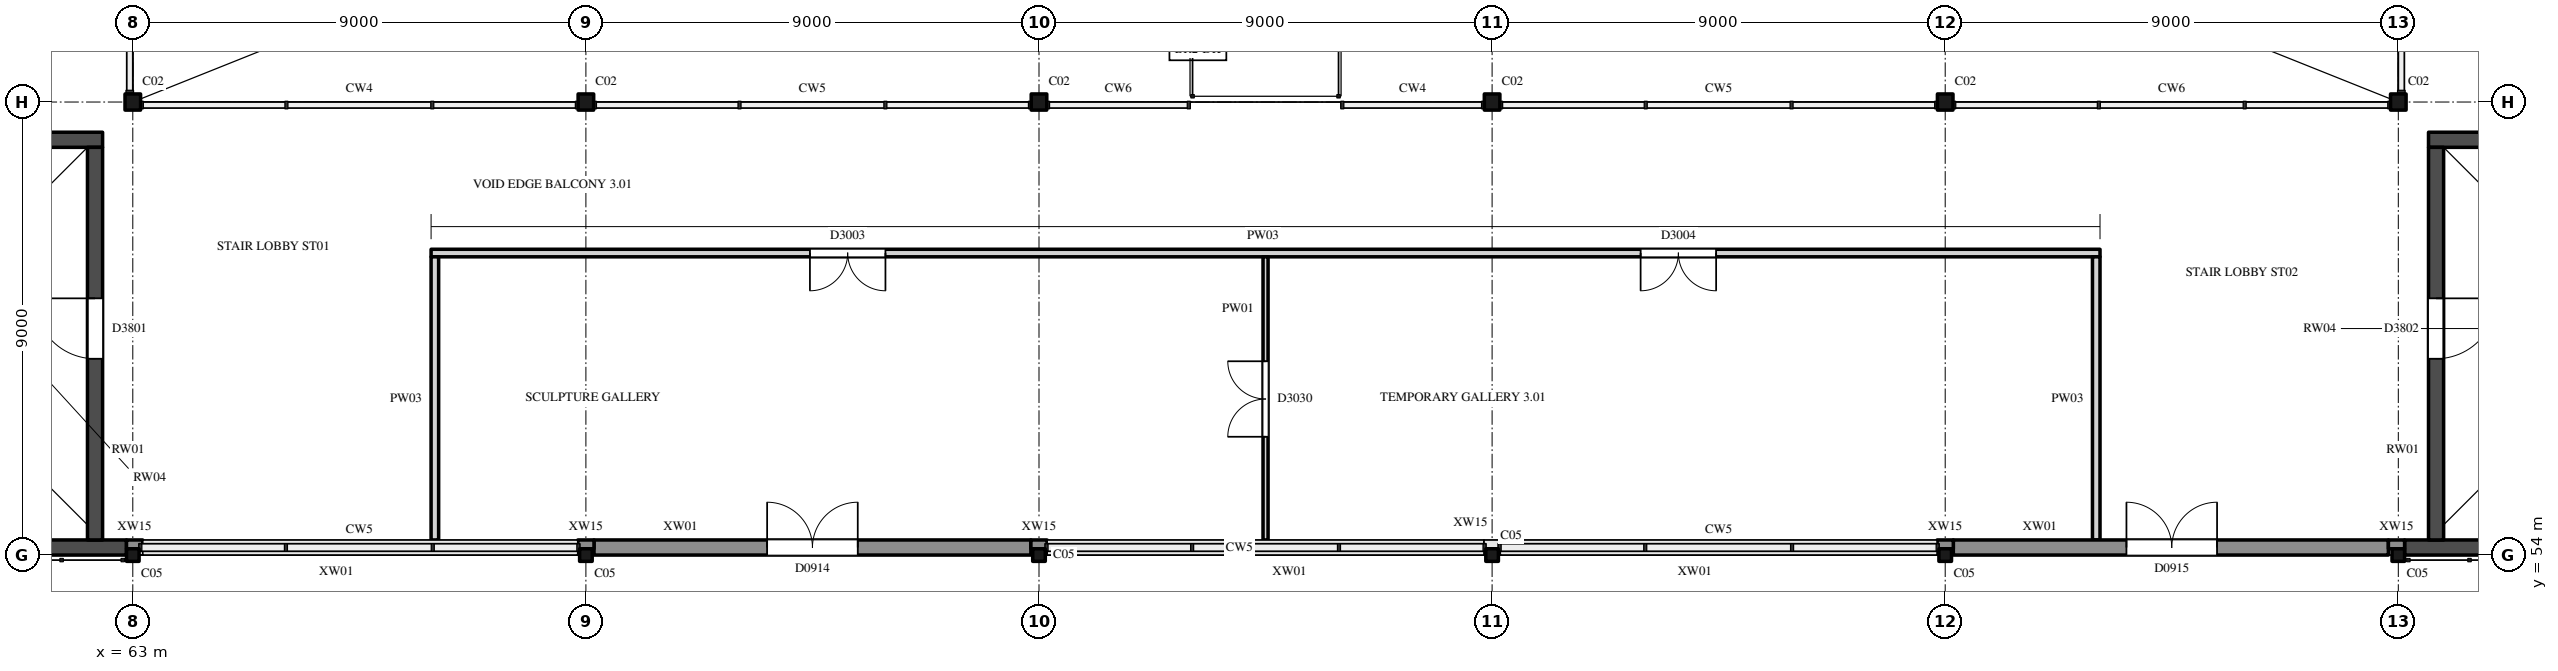
"""IFC4 building model, lengths in metres.
Left out: names, types, materials, properties, quantities, classifications, styles, units other than length and angle.
Written with IfcOpenShell. Run it as: python <this file> out.ifc"""

import sys

from ifc_helpers import new_model, si_unit, direction, frame, frame_2d, origin, origin_2d, place, context, subcontext, project, spatial, rectangle, hollow_rectangle, i_section, extrude, element, fill, save


model = new_model("IFC4")
c1 = context("Model", 3, precision=1e-05, world=origin(), true_north=direction((0.0, 1.0)))
c2 = subcontext(c1, "Body", "Model", "MODEL_VIEW")
j1 = project(units=[si_unit("LENGTHUNIT", "METRE"), si_unit("PLANEANGLEUNIT", "RADIAN")], contexts=[c1])
p1 = place(None, origin())
s1 = spatial("IfcSite", under=j1, at=p1, CompositionType="ELEMENT")
p2 = place(p1, origin())
s2 = spatial("IfcBuilding", under=s1, at=p2, CompositionType="ELEMENT")
p3 = place(p2, frame((0.0, 0.0, 16.0)))
s3 = spatial("IfcBuildingStorey", under=s2, at=p3, CompositionType="ELEMENT", Elevation=16.0)
for number, where, z_axis, x_axis in (
    (1, (63.0, 54.0, 0.0), (0.0, 0.0, 1.0), (1.0, 0.0, 0.0)),
    (2, (72.0, 54.0, 0.0), (0.0, 0.0, 1.0), (1.0, 0.0, 0.0)),
    (3, (81.0, 54.0, 0.0), (0.0, 0.0, 1.0), (1.0, 0.0, 0.0)),
    (4, (90.0, 54.0, 0.0), (0.0, 0.0, 1.0), (1.0, 0.0, 0.0)),
    (5, (99.0, 54.0, 0.0), (0.0, 0.0, 1.0), (1.0, 0.0, 0.0)),
    (6, (108.0, 54.0, 0.0), (0.0, 0.0, 1.0), (1.0, 0.0, 0.0)),
):
    element("IfcColumn", number, at=place(p3, frame(where, z_axis=z_axis, x_axis=x_axis)), inside=s3, PredefinedType="COLUMN", context=c2, shape_type="SweptSolid", body=[
        extrude(hollow_rectangle(XDim=0.25, YDim=0.25, WallThickness=0.012, InnerFilletRadius=0.019, OuterFilletRadius=0.031, at=origin_2d()), origin(), (0.0, 0.0, 1.0), 10.0),
    ])
for number, where, z_axis, x_axis in (
    (7, (63.0, 63.0, 0.0), (0.0, 0.0, 1.0), (1.0, 0.0, 0.0)),
    (8, (72.0, 63.0, 0.0), (0.0, 0.0, 1.0), (1.0, 0.0, 0.0)),
    (9, (81.0, 63.0, 0.0), (0.0, 0.0, 1.0), (1.0, 0.0, 0.0)),
    (10, (90.0, 63.0, 0.0), (0.0, 0.0, 1.0), (1.0, 0.0, 0.0)),
    (11, (99.0, 63.0, 0.0), (0.0, 0.0, 1.0), (1.0, 0.0, 0.0)),
    (12, (108.0, 63.0, 0.0), (0.0, 0.0, 1.0), (1.0, 0.0, 0.0)),
):
    element("IfcColumn", number, at=place(p3, frame(where, z_axis=z_axis, x_axis=x_axis)), inside=s3, PredefinedType="COLUMN", context=c2, shape_type="SweptSolid", body=[
        extrude(i_section(OverallWidth=0.309, OverallDepth=0.321, WebThickness=0.014, FlangeThickness=0.022, FilletRadius=0.017, at=origin_2d()), origin(), (0.0, 0.0, 1.0), 10.0),
    ])
p4 = place(p3, frame((54.3, 54.15, 0.0), z_axis=(0.0, 0.0, 1.0), x_axis=(1.0, 0.0, 0.0)))
e13 = element("IfcWall", 13, at=p4, inside=s3, PredefinedType="SHEAR", context=c2, shape_type="SweptSolid", body=[
    extrude(rectangle(XDim=8.575, YDim=0.3, at=frame_2d((4.288, 0.0))), origin(), (0.0, 0.0, 1.0), 10.0),
])
p5 = place(p3, frame((54.3, 62.25, 0.0), z_axis=(0.0, 0.0, 1.0), x_axis=(1.0, 0.0, 0.0)))
e14 = element("IfcWall", 14, at=p5, inside=s3, PredefinedType="SHEAR", context=c2, shape_type="SweptSolid", body=[
    extrude(rectangle(XDim=8.1, YDim=0.3, at=frame_2d((4.05, 0.0))), origin(), (0.0, 0.0, 1.0), 10.0),
])
p6 = place(p3, frame((62.25, 54.3, 0.0), z_axis=(0.0, 0.0, 1.0), x_axis=(0.0, 1.0, 0.0)))
e15 = element("IfcWall", 15, at=p6, inside=s3, PredefinedType="SHEAR", context=c2, shape_type="SweptSolid", body=[
    extrude(rectangle(XDim=7.8, YDim=0.3, at=frame_2d((3.9, 0.0))), origin(), (0.0, 0.0, 1.0), 10.0),
])
p7 = place(p6, frame((3.6, 0.0, 0.0)))
e16 = element("IfcOpeningElement", 16, at=p7, cuts=e15, PredefinedType="OPENING", context=c2, shape_type="SweptSolid", body=[
    extrude(rectangle(XDim=1.2, YDim=2.1, at=frame_2d((0.6, 1.05))), frame((0.0, 0.16, 0.0), z_axis=(0.0, -1.0, 0.0), x_axis=(1.0, 0.0, 0.0)), (0.0, 0.0, 1.0), 0.32),
])
p8 = place(p3, frame((108.125, 54.15, 0.0), z_axis=(0.0, 0.0, 1.0), x_axis=(1.0, 0.0, 0.0)))
e17 = element("IfcWall", 17, at=p8, inside=s3, PredefinedType="SHEAR", context=c2, shape_type="SweptSolid", body=[
    extrude(rectangle(XDim=8.575, YDim=0.3, at=frame_2d((4.288, 0.0))), origin(), (0.0, 0.0, 1.0), 10.0),
])
p9 = place(p3, frame((108.6, 62.25, 0.0), z_axis=(0.0, 0.0, 1.0), x_axis=(1.0, 0.0, 0.0)))
e18 = element("IfcWall", 18, at=p9, inside=s3, PredefinedType="SHEAR", context=c2, shape_type="SweptSolid", body=[
    extrude(rectangle(XDim=8.1, YDim=0.3, at=frame_2d((4.05, 0.0))), origin(), (0.0, 0.0, 1.0), 10.0),
])
p10 = place(p3, frame((108.75, 54.3, 0.0), z_axis=(0.0, 0.0, 1.0), x_axis=(0.0, 1.0, 0.0)))
e19 = element("IfcWall", 19, at=p10, inside=s3, PredefinedType="SHEAR", context=c2, shape_type="SweptSolid", body=[
    extrude(rectangle(XDim=7.8, YDim=0.3, at=frame_2d((3.9, 0.0))), origin(), (0.0, 0.0, 1.0), 10.0),
])
p11 = place(p10, frame((3.6, 0.0, 0.0)))
e20 = element("IfcOpeningElement", 20, at=p11, cuts=e19, PredefinedType="OPENING", context=c2, shape_type="SweptSolid", body=[
    extrude(rectangle(XDim=1.2, YDim=2.1, at=frame_2d((0.6, 1.05))), frame((0.0, 0.16, 0.0), z_axis=(0.0, -1.0, 0.0), x_axis=(1.0, 0.0, 0.0)), (0.0, 0.0, 1.0), 0.32),
])
p12 = place(p3, frame((63.197, 54.15, 0.0), z_axis=(0.0, 0.0, 1.0), x_axis=(1.0, 0.0, 0.0)))
e21 = element("IfcWall", 21, at=p12, inside=s3, PredefinedType="SOLIDWALL", context=c2, shape_type="SweptSolid", body=[
    extrude(rectangle(XDim=8.642, YDim=0.3, at=frame_2d((4.321, 0.0))), origin(), (0.0, 0.0, 1.0), 1.1),
])
p13 = place(p3, frame((72.161, 54.15, 0.0), z_axis=(0.0, 0.0, 1.0), x_axis=(1.0, 0.0, 0.0)))
e22 = element("IfcWall", 22, at=p13, inside=s3, PredefinedType="SOLIDWALL", context=c2, shape_type="SweptSolid", body=[
    extrude(rectangle(XDim=8.678, YDim=0.3, at=frame_2d((4.339, 0.0))), origin(), (0.0, 0.0, 1.0), 9.473),
])
p14 = place(p13, frame((3.439, 0.0, 0.0)))
e23 = element("IfcOpeningElement", 23, at=p14, cuts=e22, PredefinedType="OPENING", context=c2, shape_type="SweptSolid", body=[
    extrude(rectangle(XDim=1.8, YDim=2.1, at=frame_2d((0.9, 1.05))), frame((0.0, 0.16, 0.0), z_axis=(0.0, -1.0, 0.0), x_axis=(1.0, 0.0, 0.0)), (0.0, 0.0, 1.0), 0.32),
])
for number, where, z_axis, x_axis in (
    (24, (81.161, 54.15, 0.0), (0.0, 0.0, 1.0), (1.0, 0.0, 0.0)),
    (25, (90.161, 54.15, 0.0), (0.0, 0.0, 1.0), (1.0, 0.0, 0.0)),
):
    element("IfcWall", number, at=place(p3, frame(where, z_axis=z_axis, x_axis=x_axis)), inside=s3, PredefinedType="SOLIDWALL", context=c2, shape_type="SweptSolid", body=[
        extrude(rectangle(XDim=8.678, YDim=0.3, at=frame_2d((4.339, 0.0))), origin(), (0.0, 0.0, 1.0), 1.1),
    ])
p15 = place(p3, frame((99.161, 54.15, 0.0), z_axis=(0.0, 0.0, 1.0), x_axis=(1.0, 0.0, 0.0)))
e26 = element("IfcWall", 26, at=p15, inside=s3, PredefinedType="SOLIDWALL", context=c2, shape_type="SweptSolid", body=[
    extrude(rectangle(XDim=8.642, YDim=0.3, at=frame_2d((4.321, 0.0))), origin(), (0.0, 0.0, 1.0), 9.473),
])
p16 = place(p15, frame((3.439, 0.0, 0.0)))
e27 = element("IfcOpeningElement", 27, at=p16, cuts=e26, PredefinedType="OPENING", context=c2, shape_type="SweptSolid", body=[
    extrude(rectangle(XDim=1.8, YDim=2.1, at=frame_2d((0.9, 1.05))), frame((0.0, 0.16, 0.0), z_axis=(0.0, -1.0, 0.0), x_axis=(1.0, 0.0, 0.0)), (0.0, 0.0, 1.0), 0.32),
])
p17 = place(p3, frame((62.875, 54.212, 0.0), z_axis=(0.0, 0.0, 1.0), x_axis=(1.0, 0.0, 0.0)))
e28 = element("IfcWall", 28, at=p17, inside=s3, PredefinedType="SOLIDWALL", context=c2, shape_type="SweptSolid", body=[
    extrude(rectangle(XDim=0.322, YDim=0.175, at=frame_2d((0.161, 0.0))), origin(), (0.0, 0.0, 1.0), 10.0),
])
for number, where, z_axis, x_axis in (
    (29, (71.839, 54.212, 0.0), (0.0, 0.0, 1.0), (1.0, 0.0, 0.0)),
    (30, (80.839, 54.212, 0.0), (0.0, 0.0, 1.0), (1.0, 0.0, 0.0)),
):
    element("IfcWall", number, at=place(p3, frame(where, z_axis=z_axis, x_axis=x_axis)), inside=s3, PredefinedType="SOLIDWALL", context=c2, shape_type="SweptSolid", body=[
        extrude(rectangle(XDim=0.322, YDim=0.175, at=frame_2d((0.161, 0.0))), origin(), (0.0, 0.0, 1.0), 9.473),
    ])
p18 = place(p3, frame((89.839, 54.212, 0.0), z_axis=(0.0, 0.0, 1.0), x_axis=(1.0, 0.0, 0.0)))
e31 = element("IfcWall", 31, at=p18, inside=s3, PredefinedType="SOLIDWALL", context=c2, shape_type="SweptSolid", body=[
    extrude(rectangle(XDim=0.322, YDim=0.175, at=frame_2d((0.161, 0.0))), origin(), (0.0, 0.0, 1.0), 1.1),
])
p19 = place(p3, frame((98.839, 54.212, 0.0), z_axis=(0.0, 0.0, 1.0), x_axis=(1.0, 0.0, 0.0)))
e32 = element("IfcWall", 32, at=p19, inside=s3, PredefinedType="SOLIDWALL", context=c2, shape_type="SweptSolid", body=[
    extrude(rectangle(XDim=0.322, YDim=0.175, at=frame_2d((0.161, 0.0))), origin(), (0.0, 0.0, 1.0), 9.473),
])
p20 = place(p3, frame((107.803, 54.212, 0.0), z_axis=(0.0, 0.0, 1.0), x_axis=(1.0, 0.0, 0.0)))
e33 = element("IfcWall", 33, at=p20, inside=s3, PredefinedType="SOLIDWALL", context=c2, shape_type="SweptSolid", body=[
    extrude(rectangle(XDim=0.322, YDim=0.175, at=frame_2d((0.161, 0.0))), origin(), (0.0, 0.0, 1.0), 10.0),
])
p21 = place(p3, frame((68.925, 60.0, 0.0), z_axis=(0.0, 0.0, 1.0), x_axis=(1.0, 0.0, 0.0)))
e34 = element("IfcWall", 34, at=p21, inside=s3, PredefinedType="PARTITIONING", context=c2, shape_type="SweptSolid", body=[
    extrude(rectangle(XDim=33.15, YDim=0.15, at=frame_2d((16.575, 0.0))), origin(), (0.0, 0.0, 1.0), 9.521),
])
p22 = place(p21, frame((7.525, 0.0, 0.0)))
e35 = element("IfcOpeningElement", 35, at=p22, cuts=e34, PredefinedType="OPENING", context=c2, shape_type="SweptSolid", body=[
    extrude(rectangle(XDim=1.5, YDim=2.4, at=frame_2d((0.75, 1.2))), frame((0.0, 0.085, 0.0), z_axis=(0.0, -1.0, 0.0), x_axis=(1.0, 0.0, 0.0)), (0.0, 0.0, 1.0), 0.17),
])
p23 = place(p21, frame((24.025, 0.0, 0.0)))
e36 = element("IfcOpeningElement", 36, at=p23, cuts=e34, PredefinedType="OPENING", context=c2, shape_type="SweptSolid", body=[
    extrude(rectangle(XDim=1.5, YDim=2.4, at=frame_2d((0.75, 1.2))), frame((0.0, 0.085, 0.0), z_axis=(0.0, -1.0, 0.0), x_axis=(1.0, 0.0, 0.0)), (0.0, 0.0, 1.0), 0.17),
])
p24 = place(p3, frame((69.0, 54.3, 0.0), z_axis=(0.0, 0.0, 1.0), x_axis=(0.0, 1.0, 0.0)))
e37 = element("IfcWall", 37, at=p24, inside=s3, PredefinedType="PARTITIONING", context=c2, shape_type="SweptSolid", body=[
    extrude(rectangle(XDim=5.625, YDim=0.15, at=frame_2d((2.812, 0.0))), origin(), (0.0, 0.0, 1.0), 9.825),
])
p25 = place(p3, frame((85.5, 54.3, 0.0), z_axis=(0.0, 0.0, 1.0), x_axis=(0.0, 1.0, 0.0)))
e38 = element("IfcWall", 38, at=p25, inside=s3, PredefinedType="PARTITIONING", context=c2, shape_type="SweptSolid", body=[
    extrude(rectangle(XDim=5.625, YDim=0.1, at=frame_2d((2.812, 0.0))), origin(), (0.0, 0.0, 1.0), 9.825),
])
p26 = place(p25, frame((2.05, 0.0, 0.0)))
e39 = element("IfcOpeningElement", 39, at=p26, cuts=e38, PredefinedType="OPENING", context=c2, shape_type="SweptSolid", body=[
    extrude(rectangle(XDim=1.5, YDim=2.4, at=frame_2d((0.75, 1.2))), frame((0.0, 0.06, 0.0), z_axis=(0.0, -1.0, 0.0), x_axis=(1.0, 0.0, 0.0)), (0.0, 0.0, 1.0), 0.12),
])
p27 = place(p3, frame((102.0, 54.3, 0.0), z_axis=(0.0, 0.0, 1.0), x_axis=(0.0, 1.0, 0.0)))
e40 = element("IfcWall", 40, at=p27, inside=s3, PredefinedType="PARTITIONING", context=c2, shape_type="SweptSolid", body=[
    extrude(rectangle(XDim=5.625, YDim=0.15, at=frame_2d((2.812, 0.0))), origin(), (0.0, 0.0, 1.0), 9.825),
])
p28 = place(p7, origin())
e41 = element("IfcDoor", 41, at=p28, inside=s3, OperationType="SINGLE_SWING_LEFT", PredefinedType="DOOR", context=c2, shape_type="SweptSolid", body=[
    extrude(rectangle(XDim=1.2, YDim=2.1, at=frame_2d((0.6, 1.05))), frame((0.0, 0.025, 0.0), z_axis=(0.0, -1.0, 0.0), x_axis=(1.0, 0.0, 0.0)), (0.0, 0.0, 1.0), 0.05),
])
fill(e16, e41)
p29 = place(p11, origin())
e42 = element("IfcDoor", 42, at=p29, inside=s3, OperationType="SINGLE_SWING_RIGHT", PredefinedType="DOOR", context=c2, shape_type="SweptSolid", body=[
    extrude(rectangle(XDim=1.2, YDim=2.1, at=frame_2d((0.6, 1.05))), frame((0.0, 0.025, 0.0), z_axis=(0.0, -1.0, 0.0), x_axis=(1.0, 0.0, 0.0)), (0.0, 0.0, 1.0), 0.05),
])
fill(e20, e42)
p30 = place(p14, origin())
e43 = element("IfcDoor", 43, at=p30, inside=s3, OperationType="DOUBLE_DOOR_SINGLE_SWING", PredefinedType="DOOR", context=c2, shape_type="SweptSolid", body=[
    extrude(rectangle(XDim=1.8, YDim=2.1, at=frame_2d((0.9, 1.05))), frame((0.0, 0.025, 0.0), z_axis=(0.0, -1.0, 0.0), x_axis=(1.0, 0.0, 0.0)), (0.0, 0.0, 1.0), 0.05),
])
fill(e23, e43)
p31 = place(p16, origin())
e44 = element("IfcDoor", 44, at=p31, inside=s3, OperationType="DOUBLE_DOOR_SINGLE_SWING", PredefinedType="DOOR", context=c2, shape_type="SweptSolid", body=[
    extrude(rectangle(XDim=1.8, YDim=2.1, at=frame_2d((0.9, 1.05))), frame((0.0, 0.025, 0.0), z_axis=(0.0, -1.0, 0.0), x_axis=(1.0, 0.0, 0.0)), (0.0, 0.0, 1.0), 0.05),
])
fill(e27, e44)
p32 = place(p22, origin())
e45 = element("IfcDoor", 45, at=p32, inside=s3, OperationType="DOUBLE_DOOR_SINGLE_SWING", PredefinedType="DOOR", context=c2, shape_type="SweptSolid", body=[
    extrude(rectangle(XDim=1.5, YDim=2.4, at=frame_2d((0.75, 1.2))), frame((0.0, 0.025, 0.0), z_axis=(0.0, -1.0, 0.0), x_axis=(1.0, 0.0, 0.0)), (0.0, 0.0, 1.0), 0.05),
])
fill(e35, e45)
p33 = place(p23, origin())
e46 = element("IfcDoor", 46, at=p33, inside=s3, OperationType="DOUBLE_DOOR_SINGLE_SWING", PredefinedType="DOOR", context=c2, shape_type="SweptSolid", body=[
    extrude(rectangle(XDim=1.5, YDim=2.4, at=frame_2d((0.75, 1.2))), frame((0.0, 0.025, 0.0), z_axis=(0.0, -1.0, 0.0), x_axis=(1.0, 0.0, 0.0)), (0.0, 0.0, 1.0), 0.05),
])
fill(e36, e46)
p34 = place(p26, origin())
e47 = element("IfcDoor", 47, at=p34, inside=s3, OperationType="DOUBLE_DOOR_SINGLE_SWING", PredefinedType="DOOR", context=c2, shape_type="SweptSolid", body=[
    extrude(rectangle(XDim=1.5, YDim=2.4, at=frame_2d((0.75, 1.2))), frame((0.0, 0.025, 0.0), z_axis=(0.0, -1.0, 0.0), x_axis=(1.0, 0.0, 0.0)), (0.0, 0.0, 1.0), 0.05),
])
fill(e39, e47)
save(model, sys.argv[1])
